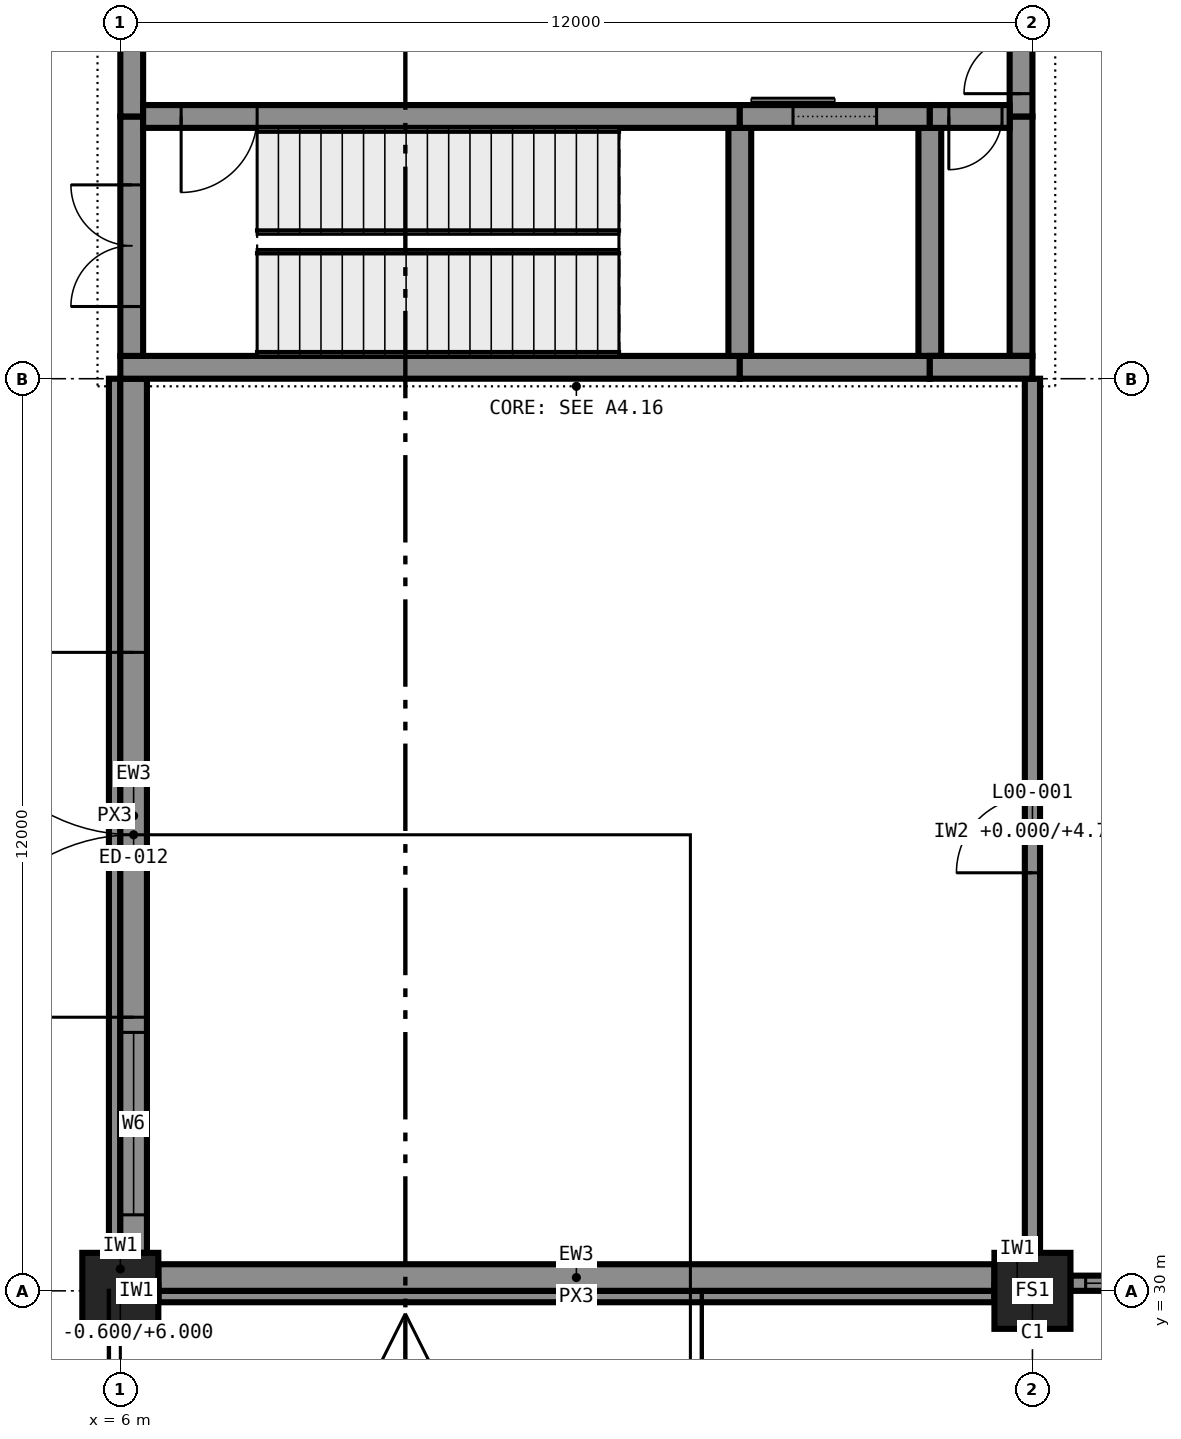
"""IFC4 building model, lengths in metres.
Left out: names, types, materials, properties, quantities, classifications, styles, units other than length and angle.
Written with IfcOpenShell. Run it as: python <this file> out.ifc"""

import sys

from ifc_helpers import new_model, si_unit, direction, frame, frame_2d, origin, origin_2d, place, context, subcontext, project, spatial, rectangle, extrude, element, fill, save


model = new_model("IFC4")
c1 = context("Model", 3, precision=1e-05, world=origin(), true_north=direction((0.0, 1.0)))
c2 = subcontext(c1, "Body", "Model", "MODEL_VIEW")
j1 = project(units=[si_unit("LENGTHUNIT", "METRE"), si_unit("PLANEANGLEUNIT", "RADIAN")], contexts=[c1])
p1 = place(None, origin())
s1 = spatial("IfcSite", under=j1, at=p1, CompositionType="ELEMENT")
p2 = place(p1, origin())
s2 = spatial("IfcBuilding", under=s1, at=p2, CompositionType="ELEMENT")
p3 = place(p2, origin())
s3 = spatial("IfcBuildingStorey", under=s2, at=p3, CompositionType="ELEMENT", Elevation=0.0)
p4 = place(p3, frame((6.0, 30.0, -0.6), z_axis=(0.0, 0.0, 1.0), x_axis=(1.0, 0.0, 0.0)))
e1 = element("IfcColumn", 1, at=p4, inside=s3, PredefinedType="COLUMN", context=c2, shape_type="SweptSolid", body=[
    extrude(rectangle(XDim=1.0, YDim=1.0, at=origin_2d()), origin(), (0.0, 0.0, 1.0), 6.6),
])
p5 = place(p3, frame((18.0, 30.0, 0.0), z_axis=(0.0, 0.0, 1.0), x_axis=(1.0, 0.0, 0.0)))
e2 = element("IfcColumn", 2, at=p5, inside=s3, PredefinedType="COLUMN", context=c2, shape_type="SweptSolid", body=[
    extrude(rectangle(XDim=1.0, YDim=1.0, at=origin_2d()), origin(), (0.0, 0.0, 1.0), 6.0),
])
p6 = place(p3, frame((6.0, 42.15, 0.0), z_axis=(0.0, 0.0, 1.0), x_axis=(1.0, 0.0, 0.0)))
e3 = element("IfcWall", 3, at=p6, inside=s3, PredefinedType="SHEAR", context=c2, shape_type="SweptSolid", body=[
    extrude(rectangle(XDim=8.15, YDim=0.3, at=frame_2d((4.075, 0.0))), origin(), (0.0, 0.0, 1.0), 5.75),
])
p7 = place(p3, frame((14.15, 42.15, 0.0), z_axis=(0.0, 0.0, 1.0), x_axis=(1.0, 0.0, 0.0)))
e4 = element("IfcWall", 4, at=p7, inside=s3, PredefinedType="SHEAR", context=c2, shape_type="SweptSolid", body=[
    extrude(rectangle(XDim=2.5, YDim=0.3, at=frame_2d((1.25, 0.0))), origin(), (0.0, 0.0, 1.0), 5.75),
])
p8 = place(p3, frame((16.65, 42.15, 0.0), z_axis=(0.0, 0.0, 1.0), x_axis=(1.0, 0.0, 0.0)))
e5 = element("IfcWall", 5, at=p8, inside=s3, PredefinedType="SHEAR", context=c2, shape_type="SweptSolid", body=[
    extrude(rectangle(XDim=1.35, YDim=0.3, at=frame_2d((0.675, 0.0))), origin(), (0.0, 0.0, 1.0), 5.75),
])
p9 = place(p3, frame((6.3, 45.45, 0.0), z_axis=(0.0, 0.0, 1.0), x_axis=(1.0, 0.0, 0.0)))
e6 = element("IfcWall", 6, at=p9, inside=s3, PredefinedType="SHEAR", context=c2, shape_type="SweptSolid", body=[
    extrude(rectangle(XDim=7.85, YDim=0.3, at=frame_2d((3.925, 0.0))), origin(), (0.0, 0.0, 1.0), 5.75),
])
p10 = place(p9, frame((0.5, 0.0, 0.0)))
e7 = element("IfcOpeningElement", 7, at=p10, cuts=e6, PredefinedType="OPENING", context=c2, shape_type="SweptSolid", body=[
    extrude(rectangle(XDim=1.0, YDim=2.1, at=frame_2d((0.5, 1.05))), frame((0.0, 0.16, 0.0), z_axis=(0.0, -1.0, 0.0), x_axis=(1.0, 0.0, 0.0)), (0.0, 0.0, 1.0), 0.32),
])
p11 = place(p3, frame((14.15, 45.45, 0.0), z_axis=(0.0, 0.0, 1.0), x_axis=(1.0, 0.0, 0.0)))
e8 = element("IfcWall", 8, at=p11, inside=s3, PredefinedType="SHEAR", context=c2, shape_type="SweptSolid", body=[
    extrude(rectangle(XDim=2.5, YDim=0.3, at=frame_2d((1.25, 0.0))), origin(), (0.0, 0.0, 1.0), 5.75),
])
p12 = place(p11, frame((0.7, 0.0, 0.0)))
e9 = element("IfcOpeningElement", 9, at=p12, cuts=e8, PredefinedType="OPENING", context=c2, shape_type="SweptSolid", body=[
    extrude(rectangle(XDim=1.1, YDim=2.1, at=frame_2d((0.55, 1.05))), frame((0.0, 0.16, 0.0), z_axis=(0.0, -1.0, 0.0), x_axis=(1.0, 0.0, 0.0)), (0.0, 0.0, 1.0), 0.32),
])
p13 = place(p3, frame((16.65, 45.45, 0.0), z_axis=(0.0, 0.0, 1.0), x_axis=(1.0, 0.0, 0.0)))
e10 = element("IfcWall", 10, at=p13, inside=s3, PredefinedType="SHEAR", context=c2, shape_type="SweptSolid", body=[
    extrude(rectangle(XDim=1.05, YDim=0.3, at=frame_2d((0.525, 0.0))), origin(), (0.0, 0.0, 1.0), 5.75),
])
p14 = place(p13, frame((0.25, 0.0, 0.0)))
e11 = element("IfcOpeningElement", 11, at=p14, cuts=e10, PredefinedType="OPENING", context=c2, shape_type="SweptSolid", body=[
    extrude(rectangle(XDim=0.7, YDim=2.1, at=frame_2d((0.35, 1.05))), frame((0.0, 0.16, 0.0), z_axis=(0.0, -1.0, 0.0), x_axis=(1.0, 0.0, 0.0)), (0.0, 0.0, 1.0), 0.32),
])
p15 = place(p3, frame((6.15, 42.3, 0.0), z_axis=(0.0, 0.0, 1.0), x_axis=(0.0, 1.0, 0.0)))
e12 = element("IfcWall", 12, at=p15, inside=s3, PredefinedType="SHEAR", context=c2, shape_type="SweptSolid", body=[
    extrude(rectangle(XDim=3.15, YDim=0.3, at=frame_2d((1.575, 0.0))), origin(), (0.0, 0.0, 1.0), 5.75),
])
p16 = place(p15, frame((0.65, 0.0, 0.0)))
e13 = element("IfcOpeningElement", 13, at=p16, cuts=e12, PredefinedType="OPENING", context=c2, shape_type="SweptSolid", body=[
    extrude(rectangle(XDim=1.6, YDim=2.1, at=frame_2d((0.8, 1.05))), frame((0.0, 0.16, 0.0), z_axis=(0.0, -1.0, 0.0), x_axis=(1.0, 0.0, 0.0)), (0.0, 0.0, 1.0), 0.32),
])
p17 = place(p3, frame((6.15, 45.45, 0.0), z_axis=(0.0, 0.0, 1.0), x_axis=(0.0, 1.0, 0.0)))
e14 = element("IfcWall", 14, at=p17, inside=s3, PredefinedType="SHEAR", context=c2, shape_type="SweptSolid", body=[
    extrude(rectangle(XDim=5.1, YDim=0.3, at=frame_2d((2.55, 0.0))), origin(), (0.0, 0.0, 1.0), 5.75),
])
p18 = place(p3, frame((17.85, 42.3, 0.0), z_axis=(0.0, 0.0, 1.0), x_axis=(0.0, 1.0, 0.0)))
e15 = element("IfcWall", 15, at=p18, inside=s3, PredefinedType="SHEAR", context=c2, shape_type="SweptSolid", body=[
    extrude(rectangle(XDim=3.15, YDim=0.3, at=frame_2d((1.575, 0.0))), origin(), (0.0, 0.0, 1.0), 5.75),
])
p19 = place(p3, frame((17.85, 45.45, 0.0), z_axis=(0.0, 0.0, 1.0), x_axis=(0.0, 1.0, 0.0)))
e16 = element("IfcWall", 16, at=p19, inside=s3, PredefinedType="SHEAR", context=c2, shape_type="SweptSolid", body=[
    extrude(rectangle(XDim=5.1, YDim=0.3, at=frame_2d((2.55, 0.0))), origin(), (0.0, 0.0, 1.0), 5.75),
])
p20 = place(p19, frame((0.3, 0.0, 0.0)))
e17 = element("IfcOpeningElement", 17, at=p20, cuts=e16, PredefinedType="OPENING", context=c2, shape_type="SweptSolid", body=[
    extrude(rectangle(XDim=1.5, YDim=2.1, at=frame_2d((0.75, 1.05))), frame((0.0, 0.16, 0.0), z_axis=(0.0, -1.0, 0.0), x_axis=(1.0, 0.0, 0.0)), (0.0, 0.0, 1.0), 0.32),
])
for number, where, z_axis, x_axis in (
    (18, (14.15, 42.3, 0.0), (0.0, 0.0, 1.0), (0.0, 1.0, 0.0)),
    (19, (16.65, 42.3, 0.0), (0.0, 0.0, 1.0), (0.0, 1.0, 0.0)),
):
    element("IfcWall", number, at=place(p3, frame(where, z_axis=z_axis, x_axis=x_axis)), inside=s3, PredefinedType="SHEAR", context=c2, shape_type="SweptSolid", body=[
        extrude(rectangle(XDim=3.0, YDim=0.3, at=frame_2d((1.5, 0.0))), origin(), (0.0, 0.0, 1.0), 5.75),
    ])
p21 = place(p3, frame((6.175, 42.0, 0.0), z_axis=(0.0, 0.0, 1.0), x_axis=(0.0, -1.0, 0.0)))
e20 = element("IfcWall", 20, at=p21, inside=s3, PredefinedType="STANDARD", context=c2, shape_type="SweptSolid", body=[
    extrude(rectangle(XDim=11.5, YDim=0.35, at=frame_2d((5.75, 0.0))), origin(), (0.0, 0.0, 1.0), 4.75),
])
p22 = place(p21, frame((8.6, 0.0, 0.45)))
e21 = element("IfcOpeningElement", 21, at=p22, cuts=e20, PredefinedType="OPENING", context=c2, shape_type="SweptSolid", body=[
    extrude(rectangle(XDim=2.4, YDim=3.0, at=frame_2d((1.2, 1.5))), frame((0.0, 0.185, 0.0), z_axis=(0.0, -1.0, 0.0), x_axis=(1.0, 0.0, 0.0)), (0.0, 0.0, 1.0), 0.37),
])
p23 = place(p21, frame((3.6, 0.0, 0.0)))
e22 = element("IfcOpeningElement", 22, at=p23, cuts=e20, PredefinedType="OPENING", context=c2, shape_type="SweptSolid", body=[
    extrude(rectangle(XDim=4.8, YDim=2.4, at=frame_2d((2.4, 1.2))), frame((0.0, 0.185, 0.0), z_axis=(0.0, -1.0, 0.0), x_axis=(1.0, 0.0, 0.0)), (0.0, 0.0, 1.0), 0.37),
])
p24 = place(p3, frame((5.925, 42.0, 5.75), z_axis=(0.0, 0.0, 1.0), x_axis=(0.0, -1.0, 0.0)))
e23 = element("IfcWall", 23, at=p24, inside=s3, PredefinedType="STANDARD", context=c2, shape_type="SweptSolid", body=[
    extrude(rectangle(XDim=11.5, YDim=0.15, at=frame_2d((5.75, 0.0))), origin(), (0.0, 0.0, 1.0), 0.25),
])
p25 = place(p3, frame((6.5, 30.175, 0.0), z_axis=(0.0, 0.0, 1.0), x_axis=(1.0, 0.0, 0.0)))
e24 = element("IfcWall", 24, at=p25, inside=s3, PredefinedType="STANDARD", context=c2, shape_type="SweptSolid", body=[
    extrude(rectangle(XDim=11.0, YDim=0.35, at=frame_2d((5.5, 0.0))), origin(), (0.0, 0.0, 1.0), 4.75),
])
p26 = place(p3, frame((6.5, 29.925, 5.75), z_axis=(0.0, 0.0, 1.0), x_axis=(1.0, 0.0, 0.0)))
e25 = element("IfcWall", 25, at=p26, inside=s3, PredefinedType="STANDARD", context=c2, shape_type="SweptSolid", body=[
    extrude(rectangle(XDim=11.0, YDim=0.15, at=frame_2d((5.5, 0.0))), origin(), (0.0, 0.0, 1.0), 0.25),
])
p27 = place(p3, frame((18.5, 30.1, 0.0), z_axis=(0.0, 0.0, 1.0), x_axis=(1.0, 0.0, 0.0)))
e26 = element("IfcWall", 26, at=p27, inside=s3, PredefinedType="STANDARD", context=c2, shape_type="SweptSolid", body=[
    extrude(rectangle(XDim=10.8, YDim=0.2, at=frame_2d((5.4, 0.0))), origin(), (0.0, 0.0, 1.0), 6.0),
])
p28 = place(p27, frame((3.1, 0.0, 0.0)))
e27 = element("IfcOpeningElement", 27, at=p28, cuts=e26, PredefinedType="OPENING", context=c2, shape_type="SweptSolid", body=[
    extrude(rectangle(XDim=4.8, YDim=2.4, at=frame_2d((2.4, 1.2))), frame((0.0, 0.11, 0.0), z_axis=(0.0, -1.0, 0.0), x_axis=(1.0, 0.0, 0.0)), (0.0, 0.0, 1.0), 0.22),
])
p29 = place(p27, frame((0.2, 0.0, 0.45)))
e28 = element("IfcOpeningElement", 28, at=p29, cuts=e26, PredefinedType="OPENING", context=c2, shape_type="SweptSolid", body=[
    extrude(rectangle(XDim=2.4, YDim=3.0, at=frame_2d((1.2, 1.5))), frame((0.0, 0.11, 0.0), z_axis=(0.0, -1.0, 0.0), x_axis=(1.0, 0.0, 0.0)), (0.0, 0.0, 1.0), 0.22),
])
p30 = place(p27, frame((8.2, 0.0, 0.45)))
e29 = element("IfcOpeningElement", 29, at=p30, cuts=e26, PredefinedType="OPENING", context=c2, shape_type="SweptSolid", body=[
    extrude(rectangle(XDim=2.4, YDim=3.0, at=frame_2d((1.2, 1.5))), frame((0.0, 0.11, 0.0), z_axis=(0.0, -1.0, 0.0), x_axis=(1.0, 0.0, 0.0)), (0.0, 0.0, 1.0), 0.22),
])
p31 = place(p3, frame((5.925, 30.0, 0.0), z_axis=(0.0, 0.0, 1.0), x_axis=(1.0, 0.0, 0.0)))
e30 = element("IfcWall", 30, at=p31, inside=s3, PredefinedType="PARTITIONING", context=c2, shape_type="SweptSolid", body=[
    extrude(rectangle(XDim=0.575, YDim=0.15, at=frame_2d((0.288, 0.0))), origin(), (0.0, 0.0, 1.0), 5.75),
])
p32 = place(p3, frame((17.5, 30.0, 0.0), z_axis=(0.0, 0.0, 1.0), x_axis=(1.0, 0.0, 0.0)))
e31 = element("IfcWall", 31, at=p32, inside=s3, PredefinedType="PARTITIONING", context=c2, shape_type="SweptSolid", body=[
    extrude(rectangle(XDim=0.6, YDim=0.15, at=frame_2d((0.3, 0.0))), origin(), (0.0, 0.0, 1.0), 5.75),
])
p33 = place(p3, frame((6.0, 30.075, 0.0), z_axis=(0.0, 0.0, 1.0), x_axis=(0.0, 1.0, 0.0)))
e32 = element("IfcWall", 32, at=p33, inside=s3, PredefinedType="PARTITIONING", context=c2, shape_type="SweptSolid", body=[
    extrude(rectangle(XDim=0.425, YDim=0.15, at=frame_2d((0.212, 0.0))), origin(), (0.0, 0.0, 1.0), 5.75),
])
p34 = place(p3, frame((18.0, 30.075, 0.0), z_axis=(0.0, 0.0, 1.0), x_axis=(0.0, 1.0, 0.0)))
e33 = element("IfcWall", 33, at=p34, inside=s3, PredefinedType="PARTITIONING", context=c2, shape_type="SweptSolid", body=[
    extrude(rectangle(XDim=11.925, YDim=0.2, at=frame_2d((5.962, 0.0))), origin(), (0.0, 0.0, 1.0), 4.75),
])
p35 = place(p34, frame((5.425, 0.0, 0.0)))
e34 = element("IfcOpeningElement", 34, at=p35, cuts=e33, PredefinedType="OPENING", context=c2, shape_type="SweptSolid", body=[
    extrude(rectangle(XDim=1.0, YDim=2.1, at=frame_2d((0.5, 1.05))), frame((0.0, 0.11, 0.0), z_axis=(0.0, -1.0, 0.0), x_axis=(1.0, 0.0, 0.0)), (0.0, 0.0, 1.0), 0.22),
])
p36 = place(p22, origin())
e35 = element("IfcWindow", 35, at=p36, inside=s3, PartitioningType="SINGLE_PANEL", PredefinedType="WINDOW", context=c2, shape_type="SweptSolid", body=[
    extrude(rectangle(XDim=2.4, YDim=3.0, at=frame_2d((1.2, 1.5))), frame((0.0, 0.03, 0.0), z_axis=(0.0, -1.0, 0.0), x_axis=(1.0, 0.0, 0.0)), (0.0, 0.0, 1.0), 0.06),
])
fill(e21, e35)
p37 = place(p23, frame((4.8, 0.0, 0.0), z_axis=(0.0, 0.0, 1.0), x_axis=(-1.0, 0.0, 0.0)))
e36 = element("IfcDoor", 36, at=p37, inside=s3, OperationType="DOUBLE_DOOR_SINGLE_SWING", PredefinedType="DOOR", context=c2, shape_type="SweptSolid", body=[
    extrude(rectangle(XDim=4.8, YDim=2.4, at=frame_2d((2.4, 1.2))), frame((0.0, 0.025, 0.0), z_axis=(0.0, -1.0, 0.0), x_axis=(1.0, 0.0, 0.0)), (0.0, 0.0, 1.0), 0.05),
])
fill(e22, e36)
p38 = place(p29, origin())
e37 = element("IfcWindow", 37, at=p38, inside=s3, PartitioningType="SINGLE_PANEL", PredefinedType="WINDOW", context=c2, shape_type="SweptSolid", body=[
    extrude(rectangle(XDim=2.4, YDim=3.0, at=frame_2d((1.2, 1.5))), frame((0.0, 0.03, 0.0), z_axis=(0.0, -1.0, 0.0), x_axis=(1.0, 0.0, 0.0)), (0.0, 0.0, 1.0), 0.06),
])
fill(e28, e37)
p39 = place(p35, origin())
e38 = element("IfcDoor", 38, at=p39, inside=s3, OperationType="SINGLE_SWING_RIGHT", PredefinedType="DOOR", context=c2, shape_type="SweptSolid", body=[
    extrude(rectangle(XDim=1.0, YDim=2.1, at=frame_2d((0.5, 1.05))), frame((0.0, 0.025, 0.0), z_axis=(0.0, -1.0, 0.0), x_axis=(1.0, 0.0, 0.0)), (0.0, 0.0, 1.0), 0.05),
])
fill(e34, e38)
p40 = place(p16, origin())
e39 = element("IfcDoor", 39, at=p40, inside=s3, OperationType="DOUBLE_DOOR_SINGLE_SWING", PredefinedType="DOOR", context=c2, shape_type="SweptSolid", body=[
    extrude(rectangle(XDim=1.6, YDim=2.1, at=frame_2d((0.8, 1.05))), frame((0.0, 0.025, 0.0), z_axis=(0.0, -1.0, 0.0), x_axis=(1.0, 0.0, 0.0)), (0.0, 0.0, 1.0), 0.05),
])
fill(e13, e39)
p41 = place(p10, frame((1.0, 0.0, 0.0), z_axis=(0.0, 0.0, 1.0), x_axis=(-1.0, 0.0, 0.0)))
e40 = element("IfcDoor", 40, at=p41, inside=s3, OperationType="SINGLE_SWING_LEFT", PredefinedType="DOOR", context=c2, shape_type="SweptSolid", body=[
    extrude(rectangle(XDim=1.0, YDim=2.1, at=frame_2d((0.5, 1.05))), frame((0.0, 0.025, 0.0), z_axis=(0.0, -1.0, 0.0), x_axis=(1.0, 0.0, 0.0)), (0.0, 0.0, 1.0), 0.05),
])
fill(e7, e40)
p42 = place(p12, origin())
e41 = element("IfcDoor", 41, at=p42, inside=s3, OperationType="SLIDING_TO_LEFT", PredefinedType="DOOR", context=c2, shape_type="SweptSolid", body=[
    extrude(rectangle(XDim=1.1, YDim=2.1, at=frame_2d((0.55, 1.05))), frame((0.0, 0.025, 0.0), z_axis=(0.0, -1.0, 0.0), x_axis=(1.0, 0.0, 0.0)), (0.0, 0.0, 1.0), 0.05),
])
fill(e9, e41)
p43 = place(p14, frame((0.7, 0.0, 0.0), z_axis=(0.0, 0.0, 1.0), x_axis=(-1.0, 0.0, 0.0)))
e42 = element("IfcDoor", 42, at=p43, inside=s3, OperationType="SINGLE_SWING_LEFT", PredefinedType="DOOR", context=c2, shape_type="SweptSolid", body=[
    extrude(rectangle(XDim=0.7, YDim=2.1, at=frame_2d((0.35, 1.05))), frame((0.0, 0.025, 0.0), z_axis=(0.0, -1.0, 0.0), x_axis=(1.0, 0.0, 0.0)), (0.0, 0.0, 1.0), 0.05),
])
fill(e11, e42)
p44 = place(p20, origin())
e43 = element("IfcDoor", 43, at=p44, inside=s3, OperationType="DOUBLE_DOOR_SINGLE_SWING", PredefinedType="DOOR", context=c2, shape_type="SweptSolid", body=[
    extrude(rectangle(XDim=1.5, YDim=2.1, at=frame_2d((0.75, 1.05))), frame((0.0, 0.025, 0.0), z_axis=(0.0, -1.0, 0.0), x_axis=(1.0, 0.0, 0.0)), (0.0, 0.0, 1.0), 0.05),
])
fill(e17, e43)
save(model, sys.argv[1])
